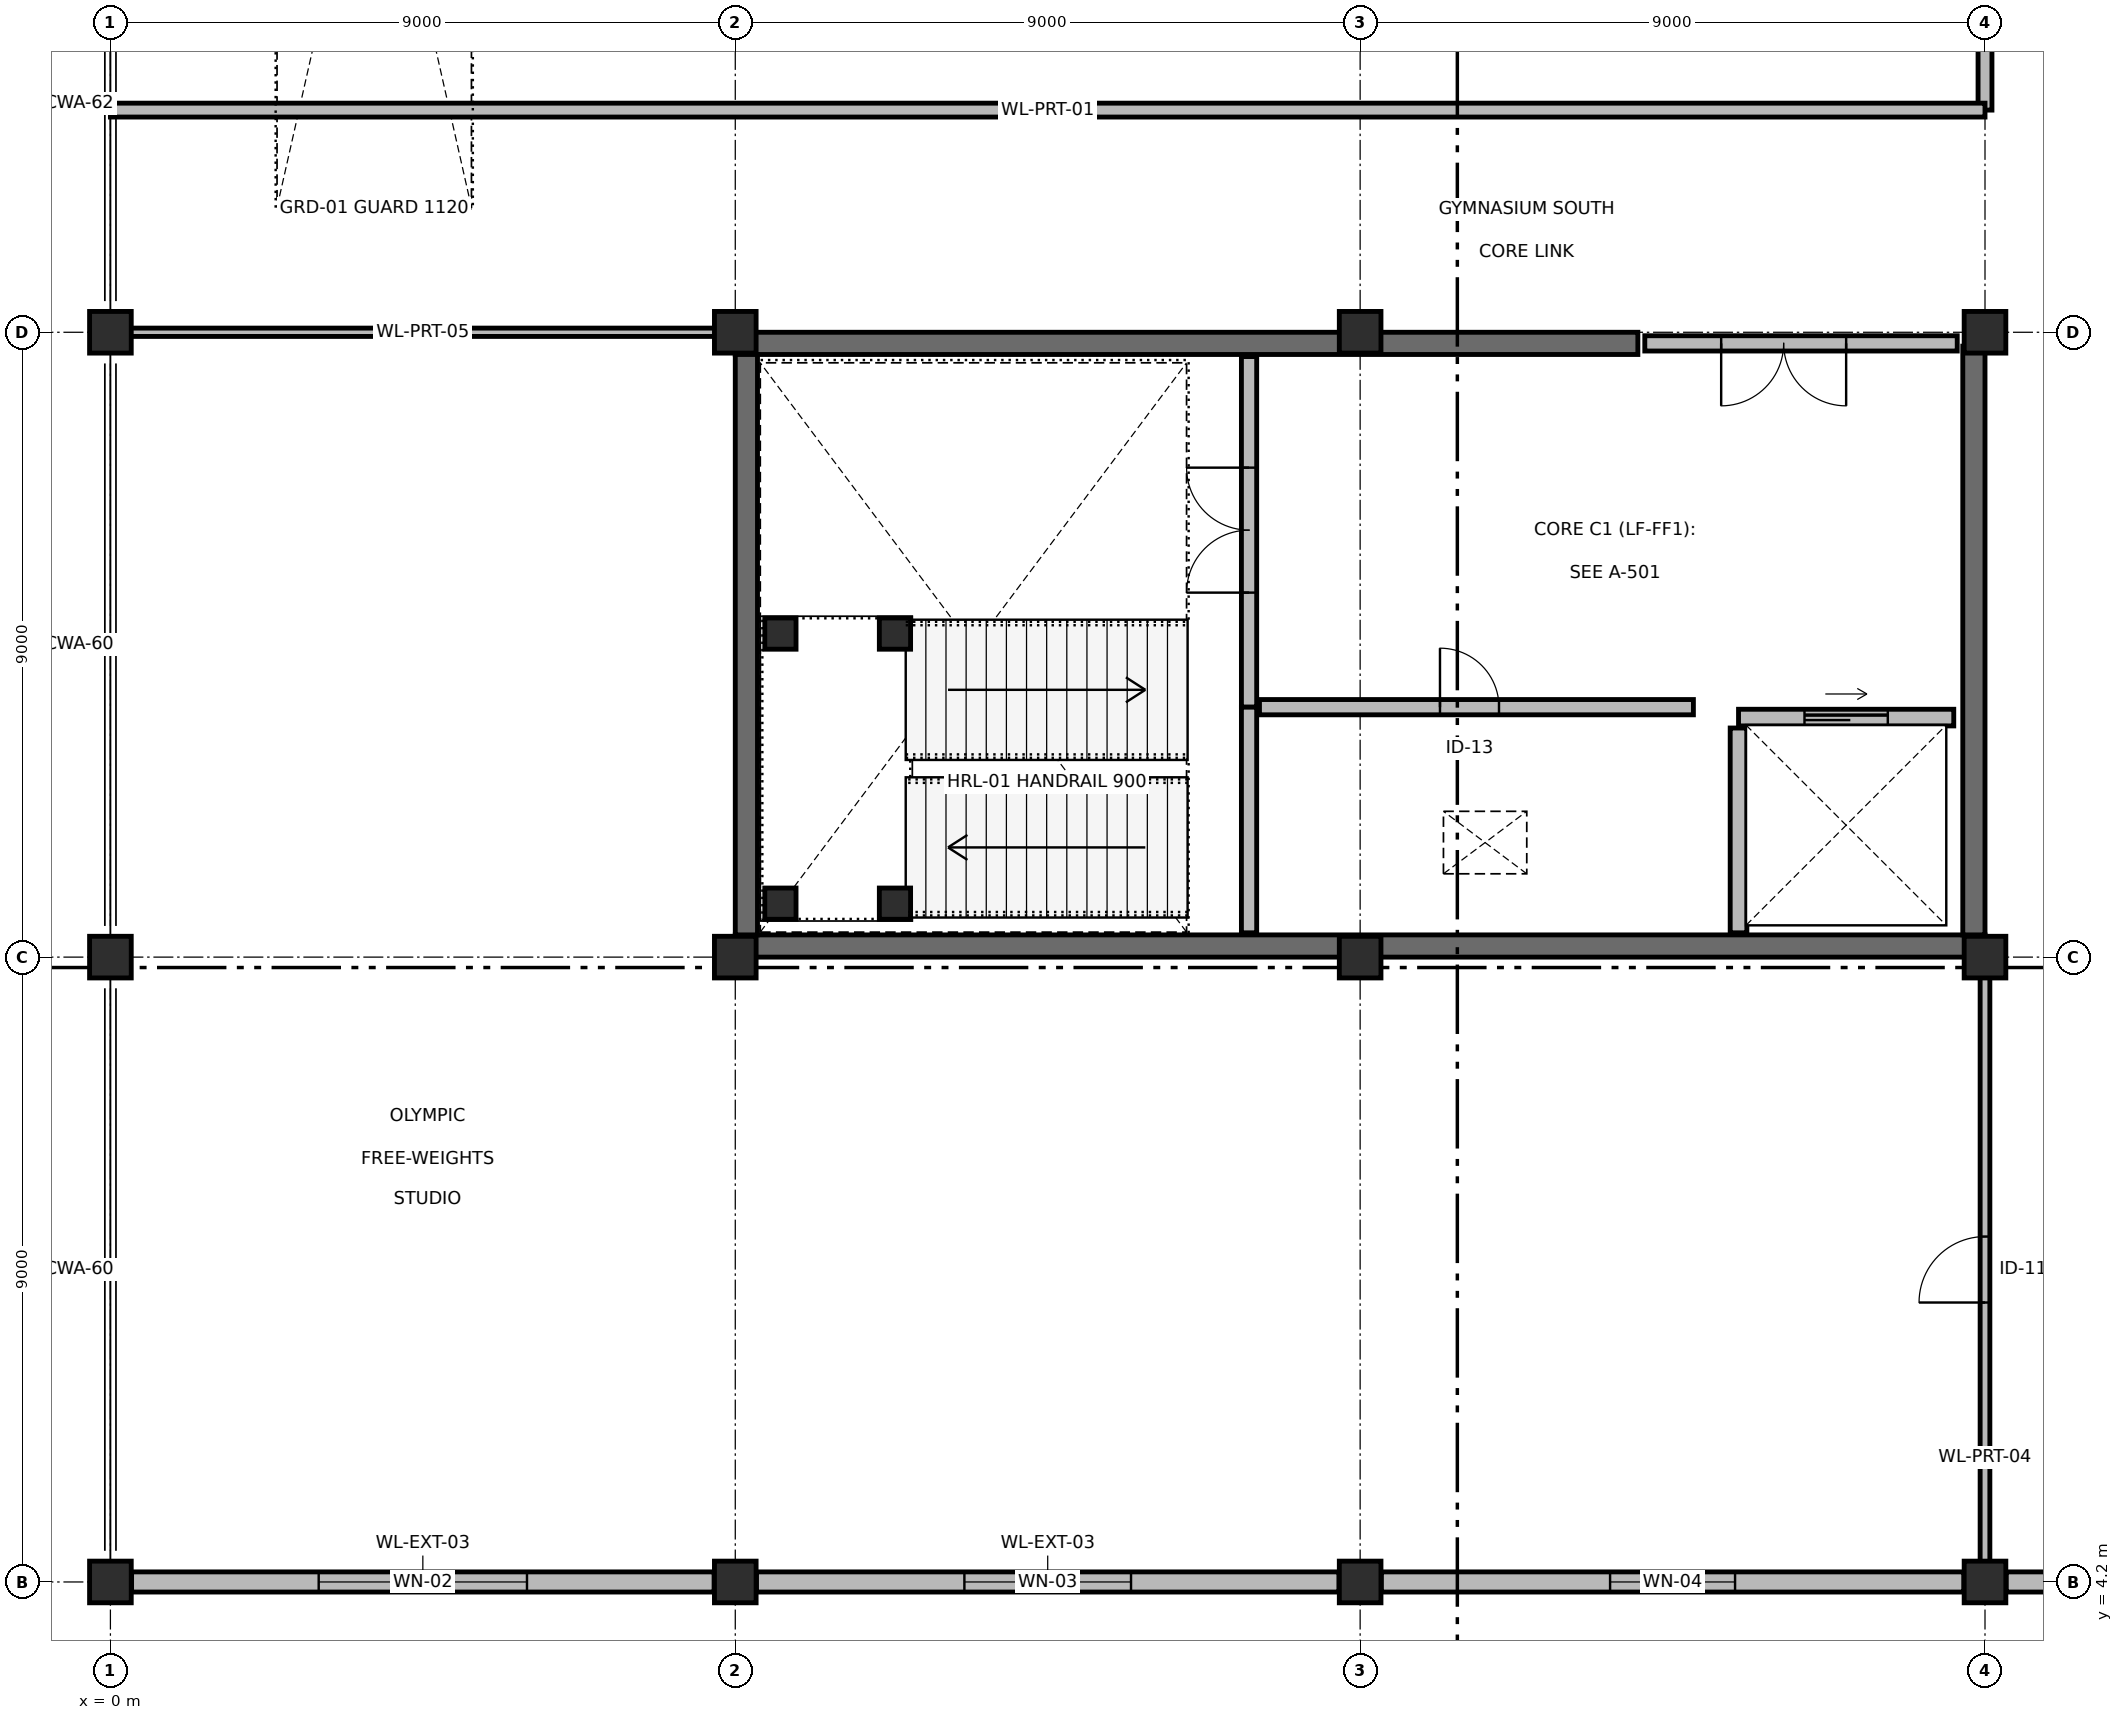
"""IFC4 building model, lengths in metres.
Left out: names, types, materials, properties, quantities, classifications, styles, units other than length and angle.
Written with IfcOpenShell. Run it as: python <this file> out.ifc"""

import sys

from ifc_helpers import new_model, si_unit, direction, frame, frame_2d, origin, origin_2d, place, context, subcontext, project, spatial, rectangle, extrude, element, fill, save


model = new_model("IFC4")
c1 = context("Model", 3, precision=1e-05, world=origin(), true_north=direction((0.0, 1.0)))
c2 = subcontext(c1, "Body", "Model", "MODEL_VIEW")
j1 = project(units=[si_unit("LENGTHUNIT", "METRE"), si_unit("PLANEANGLEUNIT", "RADIAN")], contexts=[c1])
p1 = place(None, origin())
s1 = spatial("IfcSite", under=j1, at=p1, CompositionType="ELEMENT")
p2 = place(p1, origin())
s2 = spatial("IfcBuilding", under=s1, at=p2, CompositionType="ELEMENT")
p3 = place(p2, frame((0.0, 0.0, 9.6)))
s3 = spatial("IfcBuildingStorey", under=s2, at=p3, CompositionType="ELEMENT", Elevation=9.6)
for number, where, z_axis, x_axis in (
    (1, (0.0, 4.2, 0.0), (0.0, 0.0, 1.0), (1.0, 0.0, 0.0)),
    (2, (0.0, 13.2, 0.0), (0.0, 0.0, 1.0), (1.0, 0.0, 0.0)),
    (3, (0.0, 22.2, 0.0), (0.0, 0.0, 1.0), (1.0, 0.0, 0.0)),
    (4, (9.0, 4.2, 0.0), (0.0, 0.0, 1.0), (1.0, 0.0, 0.0)),
    (5, (9.0, 13.2, 0.0), (0.0, 0.0, 1.0), (1.0, 0.0, 0.0)),
    (6, (9.0, 22.2, 0.0), (0.0, 0.0, 1.0), (1.0, 0.0, 0.0)),
    (7, (18.0, 4.2, 0.0), (0.0, 0.0, 1.0), (1.0, 0.0, 0.0)),
    (8, (18.0, 13.2, 0.0), (0.0, 0.0, 1.0), (1.0, 0.0, 0.0)),
    (9, (18.0, 22.2, 0.0), (0.0, 0.0, 1.0), (1.0, 0.0, 0.0)),
    (10, (27.0, 4.2, 0.0), (0.0, 0.0, 1.0), (1.0, 0.0, 0.0)),
    (11, (27.0, 13.2, 0.0), (0.0, 0.0, 1.0), (1.0, 0.0, 0.0)),
    (12, (27.0, 22.2, 0.0), (0.0, 0.0, 1.0), (1.0, 0.0, 0.0)),
):
    element("IfcColumn", number, at=place(p3, frame(where, z_axis=z_axis, x_axis=x_axis)), inside=s3, PredefinedType="COLUMN", context=c2, shape_type="SweptSolid", body=[
        extrude(rectangle(XDim=0.6, YDim=0.6, at=origin_2d()), origin(), (0.0, 0.0, 1.0), 4.5),
    ])
p4 = place(p3, frame((9.0, 13.36, 0.0), z_axis=(0.0, 0.0, 1.0), x_axis=(1.0, 0.0, 0.0)))
e13 = element("IfcWall", 13, at=p4, inside=s3, PredefinedType="SHEAR", context=c2, shape_type="SweptSolid", body=[
    extrude(rectangle(XDim=18.0, YDim=0.32, at=frame_2d((9.0, 0.0))), origin(), (0.0, 0.0, 1.0), 4.5),
])
p5 = place(p3, frame((9.0, 22.04, 0.0), z_axis=(0.0, 0.0, 1.0), x_axis=(1.0, 0.0, 0.0)))
e14 = element("IfcWall", 14, at=p5, inside=s3, PredefinedType="SHEAR", context=c2, shape_type="SweptSolid", body=[
    extrude(rectangle(XDim=13.0, YDim=0.32, at=frame_2d((6.5, 0.0))), origin(), (0.0, 0.0, 1.0), 4.5),
])
p6 = place(p3, frame((9.16, 13.52, 0.0), z_axis=(0.0, 0.0, 1.0), x_axis=(0.0, 1.0, 0.0)))
e15 = element("IfcWall", 15, at=p6, inside=s3, PredefinedType="SHEAR", context=c2, shape_type="SweptSolid", body=[
    extrude(rectangle(XDim=8.36, YDim=0.32, at=frame_2d((4.18, 0.0))), origin(), (0.0, 0.0, 1.0), 4.5),
])
p7 = place(p3, frame((26.84, 13.52, 0.0), z_axis=(0.0, 0.0, 1.0), x_axis=(0.0, 1.0, 0.0)))
e16 = element("IfcWall", 16, at=p7, inside=s3, PredefinedType="SHEAR", context=c2, shape_type="SweptSolid", body=[
    extrude(rectangle(XDim=8.48, YDim=0.32, at=frame_2d((4.24, 0.0))), origin(), (0.0, 0.0, 1.0), 4.5),
])
p8 = place(p3, frame((8.695, 4.2, 0.0), z_axis=(0.0, 0.0, 1.0), x_axis=(-1.0, 0.0, 0.0)))
e17 = element("IfcWall", 17, at=p8, inside=s3, PredefinedType="SOLIDWALL", context=c2, shape_type="SweptSolid", body=[
    extrude(rectangle(XDim=8.39, YDim=0.29, at=frame_2d((4.195, 0.0))), origin(), (0.0, 0.0, 1.0), 3.525),
])
p9 = place(p8, frame((2.695, 0.0, 0.95)))
e18 = element("IfcOpeningElement", 18, at=p9, cuts=e17, PredefinedType="OPENING", context=c2, shape_type="SweptSolid", body=[
    extrude(rectangle(XDim=3.0, YDim=0.9, at=frame_2d((1.5, 0.45))), frame((0.0, 0.155, 0.0), z_axis=(0.0, -1.0, 0.0), x_axis=(1.0, 0.0, 0.0)), (0.0, 0.0, 1.0), 0.31),
])
p10 = place(p3, frame((17.695, 4.2, 0.0), z_axis=(0.0, 0.0, 1.0), x_axis=(-1.0, 0.0, 0.0)))
e19 = element("IfcWall", 19, at=p10, inside=s3, PredefinedType="SOLIDWALL", context=c2, shape_type="SweptSolid", body=[
    extrude(rectangle(XDim=8.39, YDim=0.29, at=frame_2d((4.195, 0.0))), origin(), (0.0, 0.0, 1.0), 3.525),
])
p11 = place(p10, frame((2.995, 0.0, 0.95)))
e20 = element("IfcOpeningElement", 20, at=p11, cuts=e19, PredefinedType="OPENING", context=c2, shape_type="SweptSolid", body=[
    extrude(rectangle(XDim=2.4, YDim=0.9, at=frame_2d((1.2, 0.45))), frame((0.0, 0.155, 0.0), z_axis=(0.0, -1.0, 0.0), x_axis=(1.0, 0.0, 0.0)), (0.0, 0.0, 1.0), 0.31),
])
p12 = place(p3, frame((26.695, 4.2, 0.0), z_axis=(0.0, 0.0, 1.0), x_axis=(-1.0, 0.0, 0.0)))
e21 = element("IfcWall", 21, at=p12, inside=s3, PredefinedType="SOLIDWALL", context=c2, shape_type="SweptSolid", body=[
    extrude(rectangle(XDim=8.39, YDim=0.29, at=frame_2d((4.195, 0.0))), origin(), (0.0, 0.0, 1.0), 3.525),
])
p13 = place(p12, frame((3.295, 0.0, 0.95)))
e22 = element("IfcOpeningElement", 22, at=p13, cuts=e21, PredefinedType="OPENING", context=c2, shape_type="SweptSolid", body=[
    extrude(rectangle(XDim=1.8, YDim=0.9, at=frame_2d((0.9, 0.45))), frame((0.0, 0.155, 0.0), z_axis=(0.0, -1.0, 0.0), x_axis=(1.0, 0.0, 0.0)), (0.0, 0.0, 1.0), 0.31),
])
p14 = place(p3, frame((35.77, 4.2, 0.0), z_axis=(0.0, 0.0, 1.0), x_axis=(-1.0, 0.0, 0.0)))
e23 = element("IfcWall", 23, at=p14, inside=s3, PredefinedType="SOLIDWALL", context=c2, shape_type="SweptSolid", body=[
    extrude(rectangle(XDim=8.465, YDim=0.29, at=frame_2d((4.232, 0.0))), origin(), (0.0, 0.0, 1.0), 3.525),
])
p15 = place(p14, frame((2.433, 0.0, 0.95)))
e24 = element("IfcOpeningElement", 24, at=p15, cuts=e23, PredefinedType="OPENING", context=c2, shape_type="SweptSolid", body=[
    extrude(rectangle(XDim=3.6, YDim=1.2, at=frame_2d((1.8, 0.6))), frame((0.0, 0.155, 0.0), z_axis=(0.0, -1.0, 0.0), x_axis=(1.0, 0.0, 0.0)), (0.0, 0.0, 1.0), 0.31),
])
p16 = place(p3, frame((16.4, 21.85, 0.0), z_axis=(0.0, 0.0, 1.0), x_axis=(0.0, -1.0, 0.0)))
e25 = element("IfcWall", 25, at=p16, inside=s3, PredefinedType="PARTITIONING", context=c2, shape_type="SweptSolid", body=[
    extrude(rectangle(XDim=5.05, YDim=0.22, at=frame_2d((2.525, 0.0))), origin(), (0.0, 0.0, 1.0), 3.575),
])
p17 = place(p16, frame((1.6, 0.0, 0.0)))
e26 = element("IfcOpeningElement", 26, at=p17, cuts=e25, PredefinedType="OPENING", context=c2, shape_type="SweptSolid", body=[
    extrude(rectangle(XDim=1.8, YDim=2.2, at=frame_2d((0.9, 1.1))), frame((0.0, 0.12, 0.0), z_axis=(0.0, -1.0, 0.0), x_axis=(1.0, 0.0, 0.0)), (0.0, 0.0, 1.0), 0.24),
])
p18 = place(p3, frame((16.4, 13.55, 0.0), z_axis=(0.0, 0.0, 1.0), x_axis=(0.0, 1.0, 0.0)))
e27 = element("IfcWall", 27, at=p18, inside=s3, PredefinedType="PARTITIONING", context=c2, shape_type="SweptSolid", body=[
    extrude(rectangle(XDim=3.25, YDim=0.22, at=frame_2d((1.625, 0.0))), origin(), (0.0, 0.0, 1.0), 3.575),
])
p19 = place(p3, frame((16.55, 16.8, 0.0), z_axis=(0.0, 0.0, 1.0), x_axis=(1.0, 0.0, 0.0)))
e28 = element("IfcWall", 28, at=p19, inside=s3, PredefinedType="PARTITIONING", context=c2, shape_type="SweptSolid", body=[
    extrude(rectangle(XDim=6.25, YDim=0.22, at=frame_2d((3.125, 0.0))), origin(), (0.0, 0.0, 1.0), 3.625),
])
p20 = place(p19, frame((2.6, 0.0, 0.0)))
e29 = element("IfcOpeningElement", 29, at=p20, cuts=e28, PredefinedType="OPENING", context=c2, shape_type="SweptSolid", body=[
    extrude(rectangle(XDim=0.85, YDim=2.05, at=frame_2d((0.425, 1.025))), frame((0.0, 0.12, 0.0), z_axis=(0.0, -1.0, 0.0), x_axis=(1.0, 0.0, 0.0)), (0.0, 0.0, 1.0), 0.24),
])
p21 = place(p3, frame((23.45, 16.65, 0.0), z_axis=(0.0, 0.0, 1.0), x_axis=(1.0, 0.0, 0.0)))
e30 = element("IfcWall", 30, at=p21, inside=s3, PredefinedType="SOLIDWALL", context=c2, shape_type="SweptSolid", body=[
    extrude(rectangle(XDim=3.1, YDim=0.24, at=frame_2d((1.55, 0.0))), origin(), (0.0, 0.0, 1.0), 4.205),
])
p22 = place(p21, frame((0.95, 0.0, 0.0)))
e31 = element("IfcOpeningElement", 31, at=p22, cuts=e30, PredefinedType="OPENING", context=c2, shape_type="SweptSolid", body=[
    extrude(rectangle(XDim=1.2, YDim=2.2, at=frame_2d((0.6, 1.1))), frame((0.0, 0.13, 0.0), z_axis=(0.0, -1.0, 0.0), x_axis=(1.0, 0.0, 0.0)), (0.0, 0.0, 1.0), 0.26),
])
p23 = place(p3, frame((23.45, 13.55, 0.0), z_axis=(0.0, 0.0, 1.0), x_axis=(0.0, 1.0, 0.0)))
e32 = element("IfcWall", 32, at=p23, inside=s3, PredefinedType="SOLIDWALL", context=c2, shape_type="SweptSolid", body=[
    extrude(rectangle(XDim=2.95, YDim=0.24, at=frame_2d((1.475, 0.0))), origin(), (0.0, 0.0, 1.0), 3.575),
])
p24 = place(p3, frame((22.1, 22.04, 0.0), z_axis=(0.0, 0.0, 1.0), x_axis=(1.0, 0.0, 0.0)))
e33 = element("IfcWall", 33, at=p24, inside=s3, PredefinedType="PARTITIONING", context=c2, shape_type="SweptSolid", body=[
    extrude(rectangle(XDim=4.5, YDim=0.22, at=frame_2d((2.25, 0.0))), origin(), (0.0, 0.0, 1.0), 3.575),
])
p25 = place(p24, frame((1.1, 0.0, 0.0)))
e34 = element("IfcOpeningElement", 34, at=p25, cuts=e33, PredefinedType="OPENING", context=c2, shape_type="SweptSolid", body=[
    extrude(rectangle(XDim=1.8, YDim=2.2, at=frame_2d((0.9, 1.1))), frame((0.0, 0.12, 0.0), z_axis=(0.0, -1.0, 0.0), x_axis=(1.0, 0.0, 0.0)), (0.0, 0.0, 1.0), 0.24),
])
p26 = place(p3, frame((27.0, 25.4, 0.0), z_axis=(0.0, 0.0, 1.0), x_axis=(0.0, 1.0, 0.0)))
e35 = element("IfcWall", 35, at=p26, inside=s3, PredefinedType="PARTITIONING", context=c2, shape_type="SweptSolid", body=[
    extrude(rectangle(XDim=30.8, YDim=0.2, at=frame_2d((15.4, 0.0))), origin(), (0.0, 0.0, 1.0), 3.475),
])
p27 = place(p26, frame((8.099, 0.0, 0.0)))
e36 = element("IfcOpeningElement", 36, at=p27, cuts=e35, PredefinedType="OPENING", context=c2, shape_type="SweptSolid", body=[
    extrude(rectangle(XDim=1.05, YDim=2.15, at=frame_2d((0.525, 1.075))), frame((0.0, 0.11, 0.0), z_axis=(0.0, -1.0, 0.0), x_axis=(1.0, 0.0, 0.0)), (0.0, 0.0, 1.0), 0.22),
])
p28 = place(p3, frame((0.0, 25.4, 0.0), z_axis=(0.0, 0.0, 1.0), x_axis=(1.0, 0.0, 0.0)))
e37 = element("IfcWall", 37, at=p28, inside=s3, PredefinedType="PARTITIONING", context=c2, shape_type="SweptSolid", body=[
    extrude(rectangle(XDim=27.0, YDim=0.2, at=frame_2d((13.5, 0.0))), origin(), (0.0, 0.0, 1.0), 3.525),
])
p29 = place(p3, frame((0.0, 22.2, 0.0), z_axis=(0.0, 0.0, 1.0), x_axis=(1.0, 0.0, 0.0)))
e38 = element("IfcWall", 38, at=p29, inside=s3, PredefinedType="PARTITIONING", context=c2, shape_type="SweptSolid", body=[
    extrude(rectangle(XDim=9.0, YDim=0.12, at=frame_2d((4.5, 0.0))), origin(), (0.0, 0.0, 1.0), 3.525),
])
p30 = place(p3, frame((27.0, 4.2, 0.0), z_axis=(0.0, 0.0, 1.0), x_axis=(0.0, 1.0, 0.0)))
e39 = element("IfcWall", 39, at=p30, inside=s3, PredefinedType="PARTITIONING", context=c2, shape_type="SweptSolid", body=[
    extrude(rectangle(XDim=9.0, YDim=0.14, at=frame_2d((4.5, 0.0))), origin(), (0.0, 0.0, 1.0), 3.525),
])
p31 = place(p30, frame((4.025, 0.0, 0.0)))
e40 = element("IfcOpeningElement", 40, at=p31, cuts=e39, PredefinedType="OPENING", context=c2, shape_type="SweptSolid", body=[
    extrude(rectangle(XDim=0.95, YDim=2.1, at=frame_2d((0.475, 1.05))), frame((0.0, 0.08, 0.0), z_axis=(0.0, -1.0, 0.0), x_axis=(1.0, 0.0, 0.0)), (0.0, 0.0, 1.0), 0.16),
])
for number, where, z_axis, x_axis in (
    (41, (9.65, 13.97, 0.0), (0.0, 0.0, 1.0), (1.0, 0.0, 0.0)),
    (42, (11.3, 13.97, 0.0), (0.0, 0.0, 1.0), (1.0, 0.0, 0.0)),
    (43, (9.65, 17.86, 0.0), (0.0, 0.0, 1.0), (1.0, 0.0, 0.0)),
    (44, (11.3, 17.86, 0.0), (0.0, 0.0, 1.0), (1.0, 0.0, 0.0)),
):
    element("IfcColumn", number, at=place(p3, frame(where, z_axis=z_axis, x_axis=x_axis)), inside=s3, PredefinedType="COLUMN", context=c2, shape_type="SweptSolid", body=[
        extrude(rectangle(XDim=0.45, YDim=0.45, at=origin_2d()), origin(), (0.0, 0.0, 1.0), 4.5),
    ])
p32 = place(p9, origin())
e45 = element("IfcWindow", 45, at=p32, inside=s3, PartitioningType="SINGLE_PANEL", PredefinedType="WINDOW", context=c2, shape_type="SweptSolid", body=[
    extrude(rectangle(XDim=3.0, YDim=0.9, at=frame_2d((1.5, 0.45))), frame((0.0, 0.03, 0.0), z_axis=(0.0, -1.0, 0.0), x_axis=(1.0, 0.0, 0.0)), (0.0, 0.0, 1.0), 0.06),
])
fill(e18, e45)
p33 = place(p11, origin())
e46 = element("IfcWindow", 46, at=p33, inside=s3, PartitioningType="SINGLE_PANEL", PredefinedType="WINDOW", context=c2, shape_type="SweptSolid", body=[
    extrude(rectangle(XDim=2.4, YDim=0.9, at=frame_2d((1.2, 0.45))), frame((0.0, 0.03, 0.0), z_axis=(0.0, -1.0, 0.0), x_axis=(1.0, 0.0, 0.0)), (0.0, 0.0, 1.0), 0.06),
])
fill(e20, e46)
p34 = place(p13, origin())
e47 = element("IfcWindow", 47, at=p34, inside=s3, PartitioningType="SINGLE_PANEL", PredefinedType="WINDOW", context=c2, shape_type="SweptSolid", body=[
    extrude(rectangle(XDim=1.8, YDim=0.9, at=frame_2d((0.9, 0.45))), frame((0.0, 0.03, 0.0), z_axis=(0.0, -1.0, 0.0), x_axis=(1.0, 0.0, 0.0)), (0.0, 0.0, 1.0), 0.06),
])
fill(e22, e47)
p35 = place(p17, origin())
e48 = element("IfcDoor", 48, at=p35, inside=s3, OperationType="DOUBLE_DOOR_SINGLE_SWING", PredefinedType="DOOR", context=c2, shape_type="SweptSolid", body=[
    extrude(rectangle(XDim=1.8, YDim=2.2, at=frame_2d((0.9, 1.1))), frame((0.0, 0.025, 0.0), z_axis=(0.0, -1.0, 0.0), x_axis=(1.0, 0.0, 0.0)), (0.0, 0.0, 1.0), 0.05),
])
fill(e26, e48)
p36 = place(p20, origin())
e49 = element("IfcDoor", 49, at=p36, inside=s3, OperationType="SINGLE_SWING_LEFT", PredefinedType="DOOR", context=c2, shape_type="SweptSolid", body=[
    extrude(rectangle(XDim=0.85, YDim=2.05, at=frame_2d((0.425, 1.025))), frame((0.0, 0.025, 0.0), z_axis=(0.0, -1.0, 0.0), x_axis=(1.0, 0.0, 0.0)), (0.0, 0.0, 1.0), 0.05),
])
fill(e29, e49)
p37 = place(p22, origin())
e50 = element("IfcDoor", 50, at=p37, inside=s3, OperationType="DOUBLE_DOOR_SLIDING", PredefinedType="DOOR", context=c2, shape_type="SweptSolid", body=[
    extrude(rectangle(XDim=1.2, YDim=2.2, at=frame_2d((0.6, 1.1))), frame((0.0, 0.025, 0.0), z_axis=(0.0, -1.0, 0.0), x_axis=(1.0, 0.0, 0.0)), (0.0, 0.0, 1.0), 0.05),
])
fill(e31, e50)
p38 = place(p25, origin())
e51 = element("IfcDoor", 51, at=p38, inside=s3, OperationType="DOUBLE_DOOR_SINGLE_SWING", PredefinedType="DOOR", context=c2, shape_type="SweptSolid", body=[
    extrude(rectangle(XDim=1.8, YDim=2.2, at=frame_2d((0.9, 1.1))), frame((0.0, 0.025, 0.0), z_axis=(0.0, -1.0, 0.0), x_axis=(1.0, 0.0, 0.0)), (0.0, 0.0, 1.0), 0.05),
])
fill(e34, e51)
p39 = place(p31, origin())
e52 = element("IfcDoor", 52, at=p39, inside=s3, OperationType="SINGLE_SWING_LEFT", PredefinedType="DOOR", context=c2, shape_type="SweptSolid", body=[
    extrude(rectangle(XDim=0.95, YDim=2.1, at=frame_2d((0.475, 1.05))), frame((0.0, 0.025, 0.0), z_axis=(0.0, -1.0, 0.0), x_axis=(1.0, 0.0, 0.0)), (0.0, 0.0, 1.0), 0.05),
])
fill(e40, e52)
save(model, sys.argv[1])
